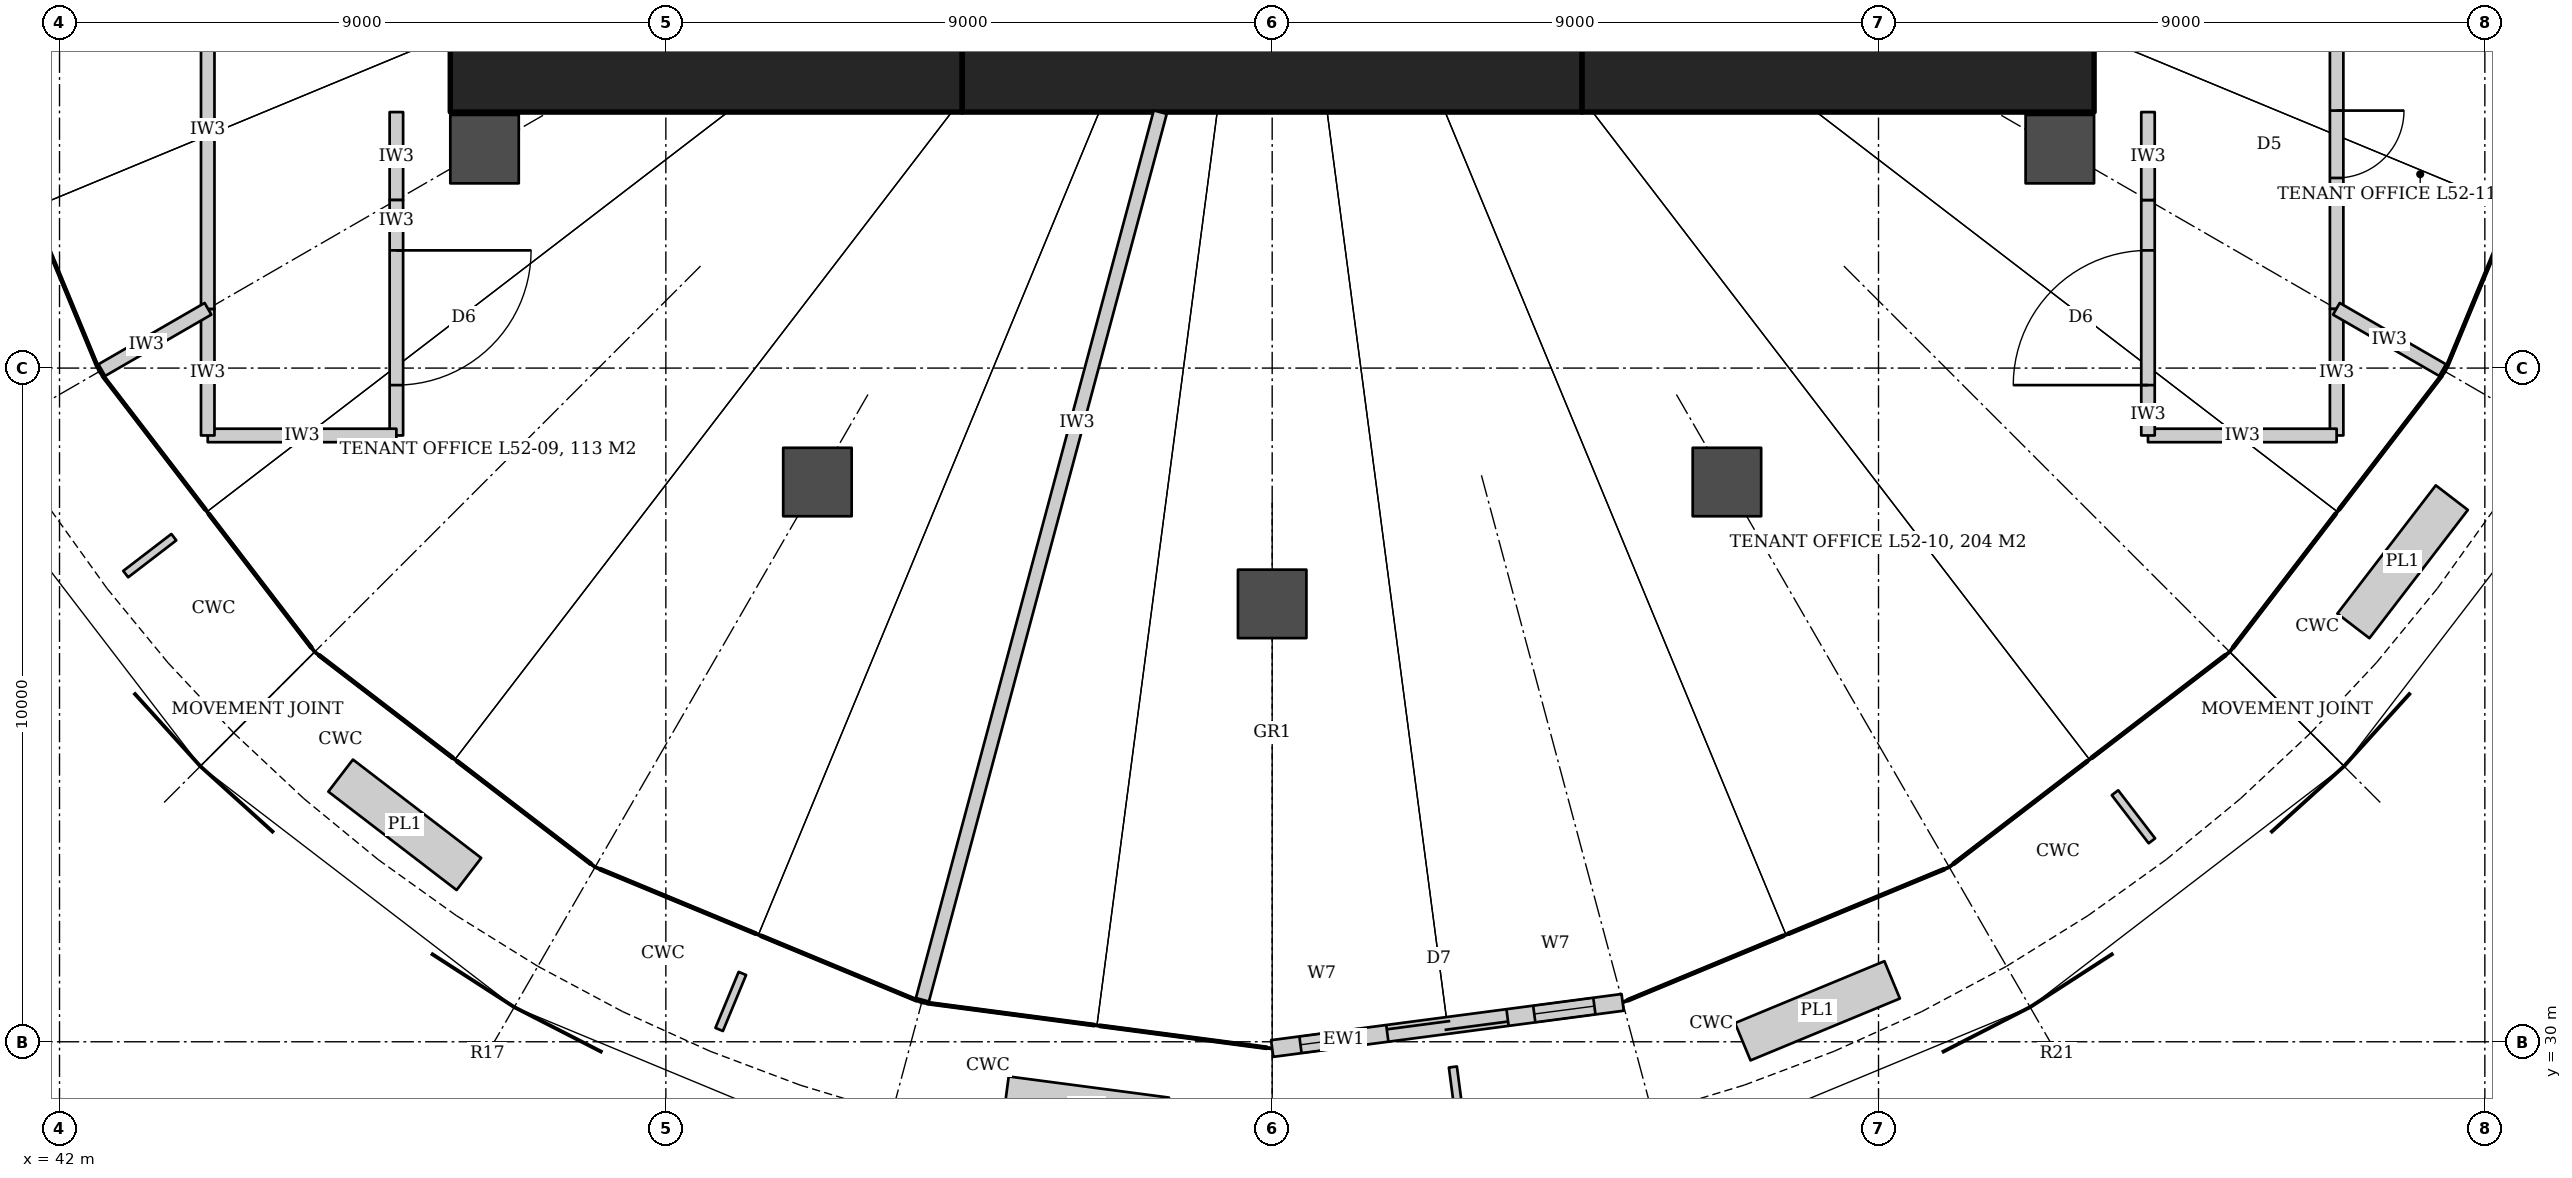
"""IFC4 building model, lengths in metres.
Left out: names, types, materials, properties, quantities, classifications, styles, units other than length and angle.
Written with IfcOpenShell. Run it as: python <this file> out.ifc"""

import sys

from ifc_helpers import new_model, si_unit, direction, frame, frame_2d, origin, origin_2d, place, context, subcontext, project, spatial, rectangle, hollow_circle, extrude, element, fill, save


model = new_model("IFC4")
c1 = context("Model", 3, precision=1e-05, world=origin(), true_north=direction((0.0, 1.0)))
c2 = subcontext(c1, "Body", "Model", "MODEL_VIEW")
j1 = project(units=[si_unit("LENGTHUNIT", "METRE"), si_unit("PLANEANGLEUNIT", "RADIAN")], contexts=[c1])
p1 = place(None, origin())
s1 = spatial("IfcSite", under=j1, at=p1, CompositionType="ELEMENT")
p2 = place(p1, origin())
s2 = spatial("IfcBuilding", under=s1, at=p2, CompositionType="ELEMENT")
p3 = place(p2, frame((0.0, 0.0, 227.6)))
s3 = spatial("IfcBuildingStorey", under=s2, at=p3, CompositionType="ELEMENT", Elevation=227.6)
p4 = place(p3, frame((47.8, 44.55, 0.0), z_axis=(0.0, 0.0, 1.0), x_axis=(1.0, 0.0, 0.0)))
e1 = element("IfcWall", 1, at=p4, inside=s3, PredefinedType="SHEAR", context=c2, shape_type="SweptSolid", body=[
    extrude(rectangle(XDim=7.6, YDim=1.5, at=frame_2d((3.8, 0.0))), origin(), (0.0, 0.0, 1.0), 4.2),
])
p5 = place(p3, frame((55.4, 44.55, 0.0), z_axis=(0.0, 0.0, 1.0), x_axis=(1.0, 0.0, 0.0)))
e2 = element("IfcWall", 2, at=p5, inside=s3, PredefinedType="SHEAR", context=c2, shape_type="SweptSolid", body=[
    extrude(rectangle(XDim=9.2, YDim=1.5, at=frame_2d((4.6, 0.0))), origin(), (0.0, 0.0, 1.0), 4.2),
])
p6 = place(p3, frame((64.6, 44.55, 0.0), z_axis=(0.0, 0.0, 1.0), x_axis=(1.0, 0.0, 0.0)))
e3 = element("IfcWall", 3, at=p6, inside=s3, PredefinedType="SHEAR", context=c2, shape_type="SweptSolid", body=[
    extrude(rectangle(XDim=7.6, YDim=1.5, at=frame_2d((3.8, 0.0))), origin(), (0.0, 0.0, 1.0), 4.2),
])
for number, where, z_axis, x_axis in (
    (4, (48.309, 43.25, 0.0), (0.0, 0.0, 1.0), (1.0, 0.0, 0.0)),
    (5, (53.25, 38.309, 0.0), (0.0, 0.0, 1.0), (1.0, 0.0, 0.0)),
    (6, (60.0, 36.5, 0.0), (0.0, 0.0, 1.0), (1.0, 0.0, 0.0)),
    (7, (66.75, 38.309, 0.0), (0.0, 0.0, 1.0), (1.0, 0.0, 0.0)),
    (8, (71.691, 43.25, 0.0), (0.0, 0.0, 1.0), (1.0, 0.0, 0.0)),
):
    element("IfcColumn", number, at=place(p3, frame(where, z_axis=z_axis, x_axis=x_axis)), inside=s3, PredefinedType="COLUMN", context=c2, shape_type="SweptSolid", body=[
        extrude(hollow_circle(Radius=0.508, WallThickness=0.05, at=origin_2d()), origin(), (0.0, 0.0, 1.0), 4.2),
    ])
p7 = place(p3, frame((75.8, 45.766, 0.0), z_axis=(0.0, 0.0, 1.0), x_axis=(0.0, -1.0, 0.0)))
e9 = element("IfcWall", 9, at=p7, inside=s3, PredefinedType="PARTITIONING", context=c2, shape_type="SweptSolid", body=[
    extrude(rectangle(XDim=4.888, YDim=0.2, at=frame_2d((2.444, 0.0))), origin(), (0.0, 0.0, 1.0), 3.02),
])
p8 = place(p7, frame((1.944, 0.0, 0.0)))
e10 = element("IfcOpeningElement", 10, at=p8, cuts=e9, PredefinedType="OPENING", context=c2, shape_type="SweptSolid", body=[
    extrude(rectangle(XDim=1.0, YDim=2.1, at=frame_2d((0.5, 1.05))), frame((0.0, 0.11, 0.0), z_axis=(0.0, -1.0, 0.0), x_axis=(1.0, 0.0, 0.0)), (0.0, 0.0, 1.0), 0.22),
])
p9 = place(p3, frame((75.8, 40.878, 0.0), z_axis=(0.0, 0.0, 1.0), x_axis=(0.0, -1.0, 0.0)))
e11 = element("IfcWall", 11, at=p9, inside=s3, PredefinedType="PARTITIONING", context=c2, shape_type="SweptSolid", body=[
    extrude(rectangle(XDim=1.878, YDim=0.2, at=frame_2d((0.939, 0.0))), origin(), (0.0, 0.0, 1.0), 3.02),
])
p10 = place(p3, frame((75.8, 39.0, 0.0), z_axis=(0.0, 0.0, 1.0), x_axis=(-1.0, 0.0, 0.0)))
e12 = element("IfcWall", 12, at=p10, inside=s3, PredefinedType="PARTITIONING", context=c2, shape_type="SweptSolid", body=[
    extrude(rectangle(XDim=2.8, YDim=0.2, at=frame_2d((1.4, 0.0))), origin(), (0.0, 0.0, 1.0), 3.04),
])
p11 = place(p3, frame((73.0, 39.0, 0.0), z_axis=(0.0, 0.0, 1.0), x_axis=(0.0, 1.0, 0.0)))
e13 = element("IfcWall", 13, at=p11, inside=s3, PredefinedType="PARTITIONING", context=c2, shape_type="SweptSolid", body=[
    extrude(rectangle(XDim=3.494, YDim=0.2, at=frame_2d((1.747, 0.0))), origin(), (0.0, 0.0, 1.0), 3.02),
])
p12 = place(p11, frame((0.747, 0.0, 0.0)))
e14 = element("IfcOpeningElement", 14, at=p12, cuts=e13, PredefinedType="OPENING", context=c2, shape_type="SweptSolid", body=[
    extrude(rectangle(XDim=2.0, YDim=2.1, at=frame_2d((1.0, 1.05))), frame((0.0, 0.11, 0.0), z_axis=(0.0, -1.0, 0.0), x_axis=(1.0, 0.0, 0.0)), (0.0, 0.0, 1.0), 0.22),
])
for number, where, z_axis, x_axis in (
    (15, (73.0, 42.494, 0.0), (0.0, 0.0, 1.0), (0.0, 1.0, 0.0)),
    (16, (47.0, 43.8, 0.0), (0.0, 0.0, 1.0), (0.0, -1.0, 0.0)),
):
    element("IfcWall", number, at=place(p3, frame(where, z_axis=z_axis, x_axis=x_axis)), inside=s3, PredefinedType="PARTITIONING", context=c2, shape_type="SweptSolid", body=[
        extrude(rectangle(XDim=1.306, YDim=0.2, at=frame_2d((0.653, 0.0))), origin(), (0.0, 0.0, 1.0), 3.02),
    ])
p13 = place(p3, frame((47.0, 42.494, 0.0), z_axis=(0.0, 0.0, 1.0), x_axis=(0.0, -1.0, 0.0)))
e17 = element("IfcWall", 17, at=p13, inside=s3, PredefinedType="PARTITIONING", context=c2, shape_type="SweptSolid", body=[
    extrude(rectangle(XDim=3.494, YDim=0.2, at=frame_2d((1.747, 0.0))), origin(), (0.0, 0.0, 1.0), 3.02),
])
p14 = place(p13, frame((0.747, 0.0, 0.0)))
e18 = element("IfcOpeningElement", 18, at=p14, cuts=e17, PredefinedType="OPENING", context=c2, shape_type="SweptSolid", body=[
    extrude(rectangle(XDim=2.0, YDim=2.1, at=frame_2d((1.0, 1.05))), frame((0.0, 0.11, 0.0), z_axis=(0.0, -1.0, 0.0), x_axis=(1.0, 0.0, 0.0)), (0.0, 0.0, 1.0), 0.22),
])
p15 = place(p3, frame((47.0, 39.0, 0.0), z_axis=(0.0, 0.0, 1.0), x_axis=(-1.0, 0.0, 0.0)))
e19 = element("IfcWall", 19, at=p15, inside=s3, PredefinedType="PARTITIONING", context=c2, shape_type="SweptSolid", body=[
    extrude(rectangle(XDim=2.8, YDim=0.2, at=frame_2d((1.4, 0.0))), origin(), (0.0, 0.0, 1.0), 3.04),
])
p16 = place(p3, frame((44.2, 39.0, 0.0), z_axis=(0.0, 0.0, 1.0), x_axis=(0.0, 1.0, 0.0)))
e20 = element("IfcWall", 20, at=p16, inside=s3, PredefinedType="PARTITIONING", context=c2, shape_type="SweptSolid", body=[
    extrude(rectangle(XDim=1.878, YDim=0.2, at=frame_2d((0.939, 0.0))), origin(), (0.0, 0.0, 1.0), 3.02),
])
p17 = place(p3, frame((44.2, 40.878, 0.0), z_axis=(0.0, 0.0, 1.0), x_axis=(0.0, 1.0, 0.0)))
e21 = element("IfcWall", 21, at=p17, inside=s3, PredefinedType="PARTITIONING", context=c2, shape_type="SweptSolid", body=[
    extrude(rectangle(XDim=13.356, YDim=0.2, at=frame_2d((6.678, 0.0))), origin(), (0.0, 0.0, 1.0), 3.02),
])
p18 = place(p17, frame((5.678, 0.0, 0.0)))
e22 = element("IfcOpeningElement", 22, at=p18, cuts=e21, PredefinedType="OPENING", context=c2, shape_type="SweptSolid", body=[
    extrude(rectangle(XDim=2.0, YDim=2.1, at=frame_2d((1.0, 1.05))), frame((0.0, 0.11, 0.0), z_axis=(0.0, -1.0, 0.0), x_axis=(1.0, 0.0, 0.0)), (0.0, 0.0, 1.0), 0.22),
])
p19 = place(p3, frame((44.204, 40.88, 0.0), z_axis=(0.0, 0.0, 1.0), x_axis=(-0.866047089031, -0.499962438169, 0.0)))
e23 = element("IfcWall", 23, at=p19, inside=s3, PredefinedType="PARTITIONING", context=c2, shape_type="SweptSolid", body=[
    extrude(rectangle(XDim=1.82, YDim=0.2, at=frame_2d((0.91, 0.0))), origin(), (0.0, 0.0, 1.0), 3.02),
])
p20 = place(p3, frame((58.338, 43.799, 0.0), z_axis=(0.0, 0.0, 1.0), x_axis=(-0.258816604947, -0.965926480123, 0.0)))
e24 = element("IfcWall", 24, at=p20, inside=s3, PredefinedType="PARTITIONING", context=c2, shape_type="SweptSolid", body=[
    extrude(rectangle(XDim=13.64, YDim=0.2, at=frame_2d((6.82, 0.0))), origin(), (0.0, 0.0, 1.0), 3.02),
])
p21 = place(p3, frame((75.796, 40.88, 0.0), z_axis=(0.0, 0.0, 1.0), x_axis=(0.866047089031, -0.499962438169, 0.0)))
e25 = element("IfcWall", 25, at=p21, inside=s3, PredefinedType="PARTITIONING", context=c2, shape_type="SweptSolid", body=[
    extrude(rectangle(XDim=1.82, YDim=0.2, at=frame_2d((0.91, 0.0))), origin(), (0.0, 0.0, 1.0), 3.02),
])
p22 = place(p3, frame((60.0, 29.9, 0.0), z_axis=(0.0, 0.0, 1.0), x_axis=(0.991440353351, 0.130560429487, 0.0)))
e26 = element("IfcWall", 26, at=p22, inside=s3, PredefinedType="SOLIDWALL", context=c2, shape_type="SweptSolid", body=[
    extrude(rectangle(XDim=5.247, YDim=0.25, at=frame_2d((2.624, 0.0))), origin(), (0.0, 0.0, 1.0), 4.04),
])
p23 = place(p22, frame((1.724, 0.0, 0.0)))
e27 = element("IfcOpeningElement", 27, at=p23, cuts=e26, PredefinedType="OPENING", context=c2, shape_type="SweptSolid", body=[
    extrude(rectangle(XDim=1.8, YDim=2.4, at=frame_2d((0.9, 1.2))), frame((0.0, 0.135, 0.0), z_axis=(0.0, -1.0, 0.0), x_axis=(1.0, 0.0, 0.0)), (0.0, 0.0, 1.0), 0.27),
])
p24 = place(p22, frame((0.424, 0.0, 0.0)))
e28 = element("IfcOpeningElement", 28, at=p24, cuts=e26, PredefinedType="OPENING", context=c2, shape_type="SweptSolid", body=[
    extrude(rectangle(XDim=0.9, YDim=2.4, at=frame_2d((0.45, 1.2))), frame((0.0, 0.135, 0.0), z_axis=(0.0, -1.0, 0.0), x_axis=(1.0, 0.0, 0.0)), (0.0, 0.0, 1.0), 0.27),
])
p25 = place(p22, frame((3.924, 0.0, 0.0)))
e29 = element("IfcOpeningElement", 29, at=p25, cuts=e26, PredefinedType="OPENING", context=c2, shape_type="SweptSolid", body=[
    extrude(rectangle(XDim=0.9, YDim=2.4, at=frame_2d((0.45, 1.2))), frame((0.0, 0.135, 0.0), z_axis=(0.0, -1.0, 0.0), x_axis=(1.0, 0.0, 0.0)), (0.0, 0.0, 1.0), 0.27),
])
p26 = place(p14, origin())
e30 = element("IfcDoor", 30, at=p26, inside=s3, OperationType="DOUBLE_DOOR_DOUBLE_SWING", PredefinedType="DOOR", context=c2, shape_type="SweptSolid", body=[
    extrude(rectangle(XDim=2.0, YDim=2.1, at=frame_2d((1.0, 1.05))), frame((0.0, 0.025, 0.0), z_axis=(0.0, -1.0, 0.0), x_axis=(1.0, 0.0, 0.0)), (0.0, 0.0, 1.0), 0.05),
])
fill(e18, e30)
p27 = place(p12, origin())
e31 = element("IfcDoor", 31, at=p27, inside=s3, OperationType="DOUBLE_DOOR_DOUBLE_SWING", PredefinedType="DOOR", context=c2, shape_type="SweptSolid", body=[
    extrude(rectangle(XDim=2.0, YDim=2.1, at=frame_2d((1.0, 1.05))), frame((0.0, 0.025, 0.0), z_axis=(0.0, -1.0, 0.0), x_axis=(1.0, 0.0, 0.0)), (0.0, 0.0, 1.0), 0.05),
])
fill(e14, e31)
p28 = place(p8, origin())
e32 = element("IfcDoor", 32, at=p28, inside=s3, OperationType="SINGLE_SWING_LEFT", PredefinedType="DOOR", context=c2, shape_type="SweptSolid", body=[
    extrude(rectangle(XDim=1.0, YDim=2.1, at=frame_2d((0.5, 1.05))), frame((0.0, 0.025, 0.0), z_axis=(0.0, -1.0, 0.0), x_axis=(1.0, 0.0, 0.0)), (0.0, 0.0, 1.0), 0.05),
])
fill(e10, e32)
p29 = place(p23, origin())
e33 = element("IfcDoor", 33, at=p29, inside=s3, OperationType="DOUBLE_DOOR_SLIDING", PredefinedType="DOOR", context=c2, shape_type="SweptSolid", body=[
    extrude(rectangle(XDim=1.8, YDim=2.4, at=frame_2d((0.9, 1.2))), frame((0.0, 0.025, 0.0), z_axis=(0.0, -1.0, 0.0), x_axis=(1.0, 0.0, 0.0)), (0.0, 0.0, 1.0), 0.05),
])
fill(e27, e33)
p30 = place(p24, origin())
e34 = element("IfcWindow", 34, at=p30, inside=s3, PartitioningType="SINGLE_PANEL", PredefinedType="WINDOW", context=c2, shape_type="SweptSolid", body=[
    extrude(rectangle(XDim=0.9, YDim=2.4, at=frame_2d((0.45, 1.2))), frame((0.0, 0.03, 0.0), z_axis=(0.0, -1.0, 0.0), x_axis=(1.0, 0.0, 0.0)), (0.0, 0.0, 1.0), 0.06),
])
fill(e28, e34)
p31 = place(p25, origin())
e35 = element("IfcWindow", 35, at=p31, inside=s3, PartitioningType="SINGLE_PANEL", PredefinedType="WINDOW", context=c2, shape_type="SweptSolid", body=[
    extrude(rectangle(XDim=0.9, YDim=2.4, at=frame_2d((0.45, 1.2))), frame((0.0, 0.03, 0.0), z_axis=(0.0, -1.0, 0.0), x_axis=(1.0, 0.0, 0.0)), (0.0, 0.0, 1.0), 0.06),
])
fill(e29, e35)
save(model, sys.argv[1])
